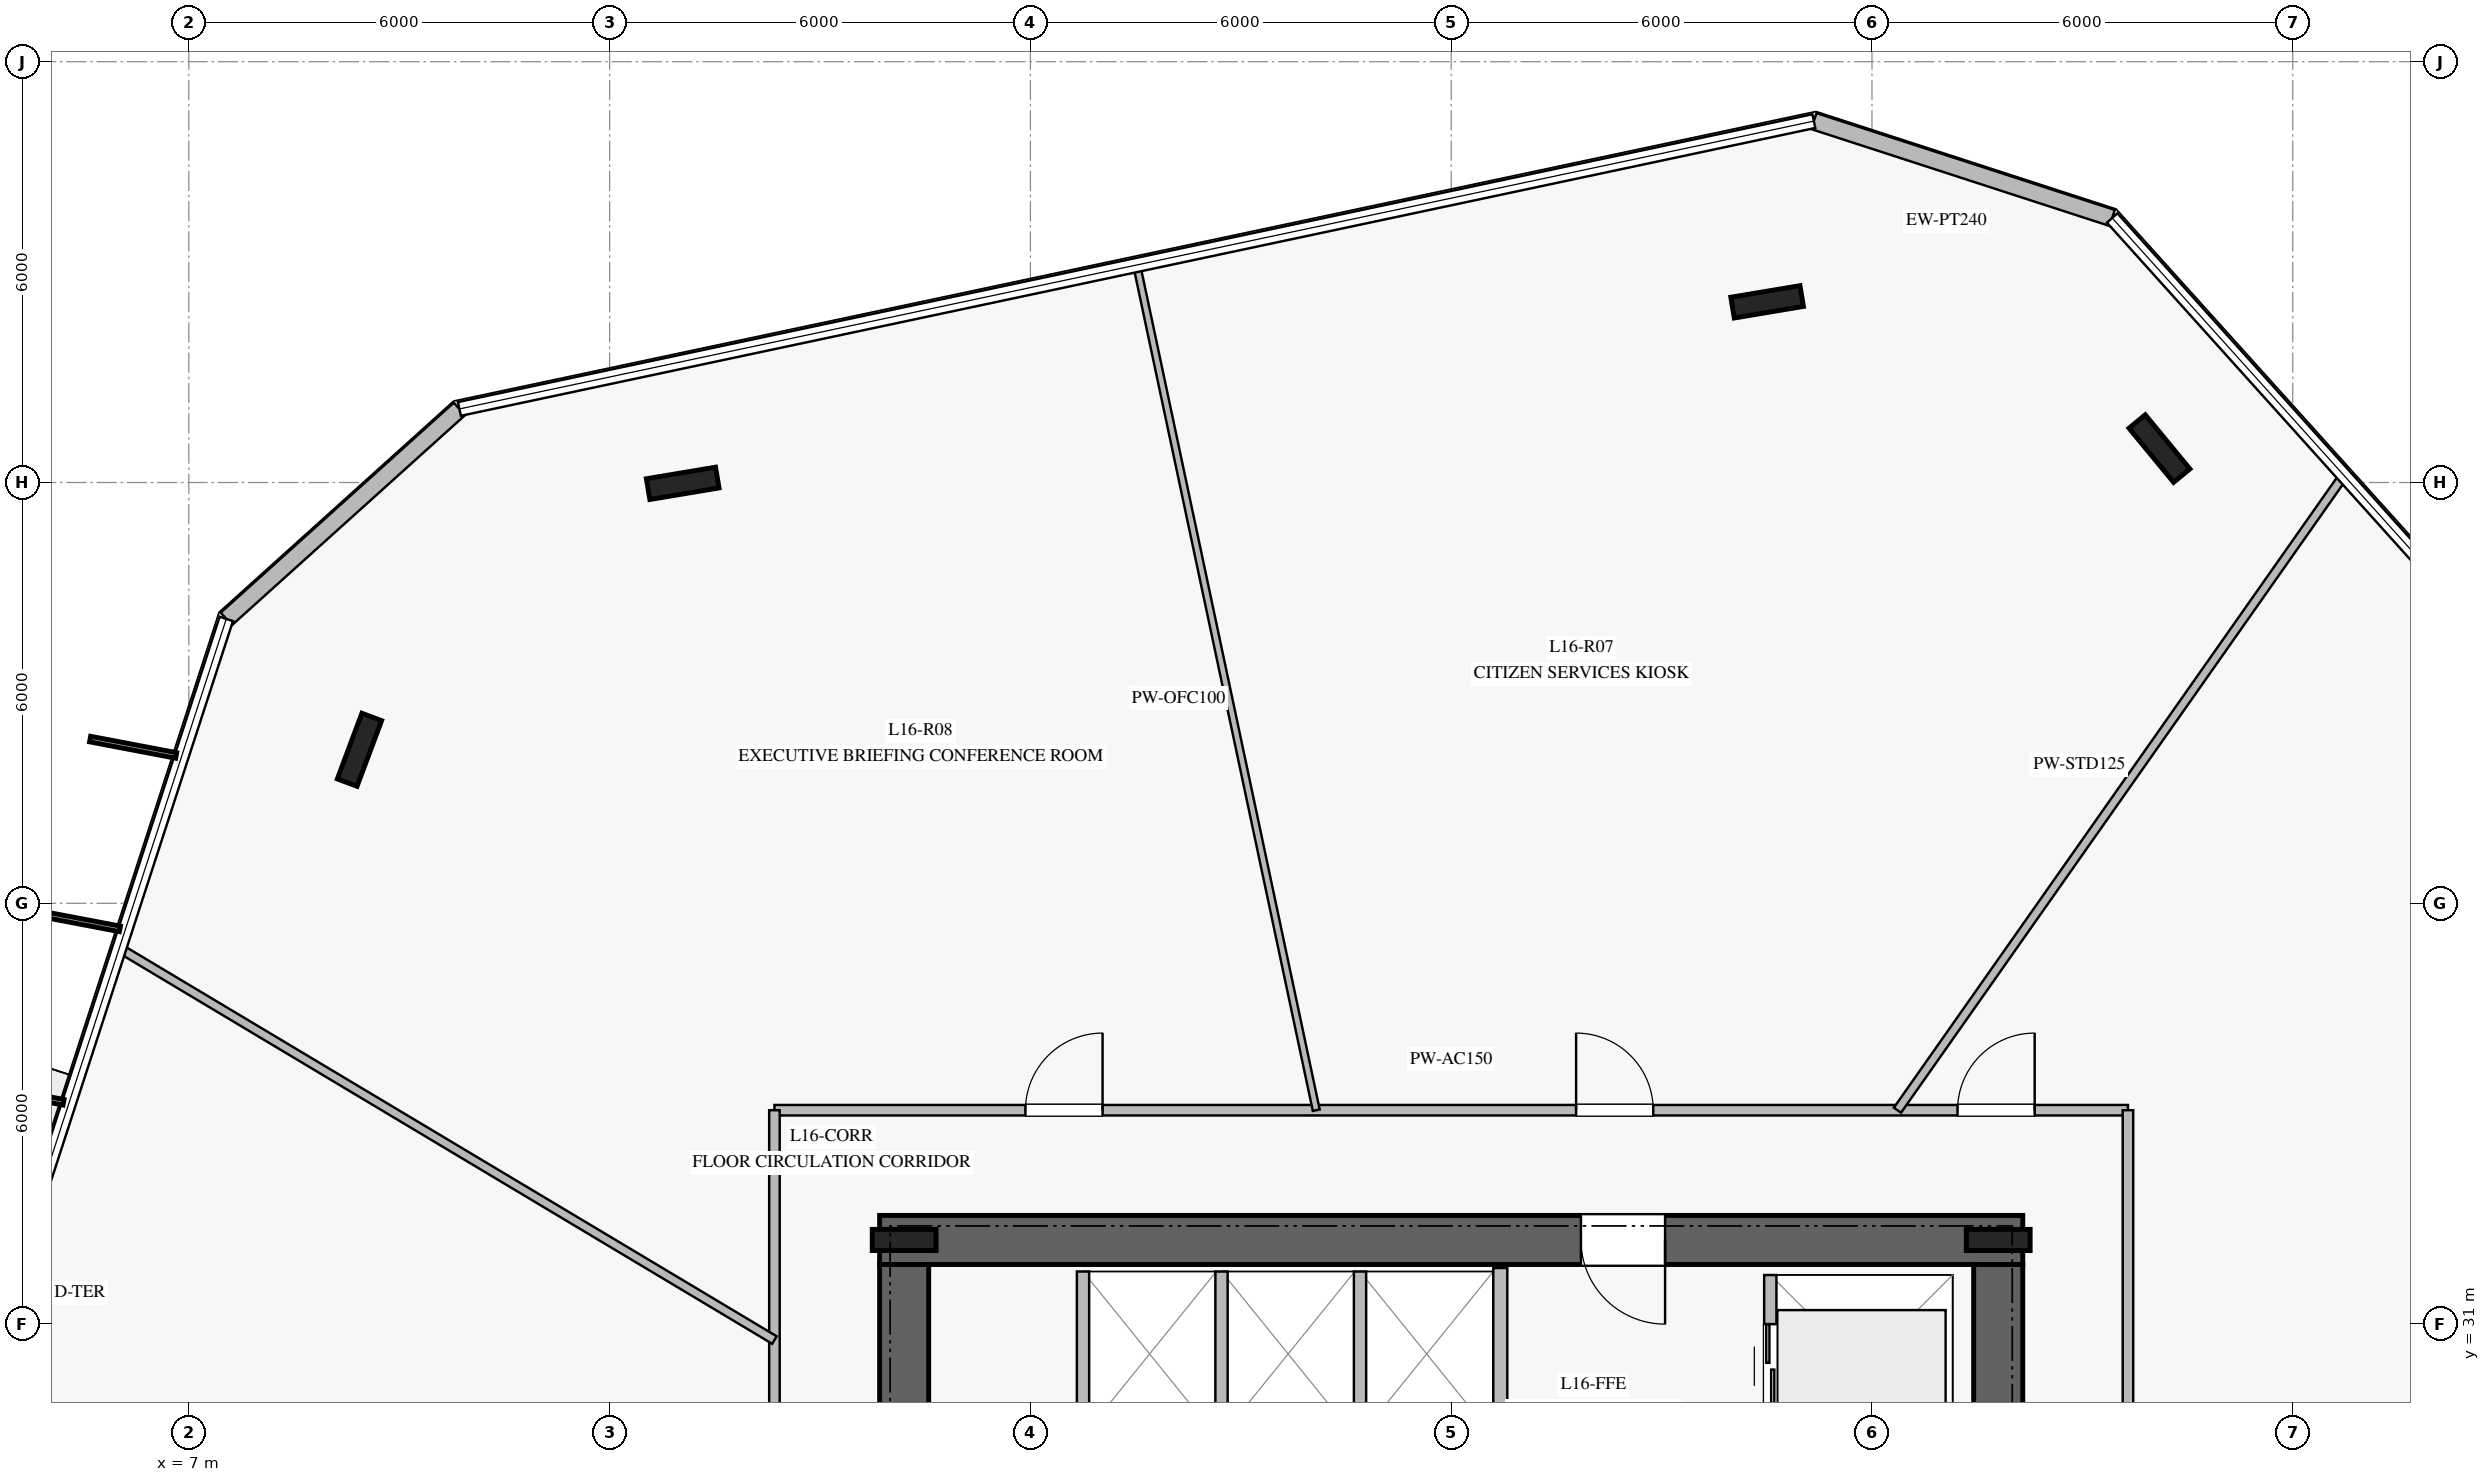
"""IFC4 building model, lengths in metres.
Left out: names, types, materials, properties, quantities, classifications, styles, units other than length and angle.
Written with IfcOpenShell. Run it as: python <this file> out.ifc"""

import sys

from ifc_helpers import new_model, si_unit, direction, frame, frame_2d, origin, origin_2d, place, context, subcontext, project, spatial, rectangle, i_section, extrude, element, fill, save


model = new_model("IFC4")
c1 = context("Model", 3, precision=1e-05, world=origin(), true_north=direction((0.0, 1.0)))
c2 = subcontext(c1, "Body", "Model", "MODEL_VIEW")
j1 = project(units=[si_unit("LENGTHUNIT", "METRE"), si_unit("PLANEANGLEUNIT", "RADIAN")], contexts=[c1])
p1 = place(None, origin())
s1 = spatial("IfcSite", under=j1, at=p1, CompositionType="ELEMENT")
p2 = place(p1, origin())
s2 = spatial("IfcBuilding", under=s1, at=p2, CompositionType="ELEMENT")
p3 = place(p2, frame((0.0, 0.0, 68.0)))
s3 = spatial("IfcBuildingStorey", under=s2, at=p3, CompositionType="ELEMENT", Elevation=68.0)
p4 = place(p3, frame((33.15, 32.2, 0.0), z_axis=(0.0, 0.0, 1.0), x_axis=(-1.0, 0.0, 0.0)))
e1 = element("IfcWall", 1, at=p4, inside=s3, PredefinedType="SHEAR", context=c2, shape_type="SweptSolid", body=[
    extrude(rectangle(XDim=16.3, YDim=0.7, at=frame_2d((8.15, 0.0))), origin(), (0.0, 0.0, 1.0), 3.76),
])
p5 = place(p4, frame((5.1, 0.0, 0.0)))
e2 = element("IfcOpeningElement", 2, at=p5, cuts=e1, PredefinedType="OPENING", context=c2, shape_type="SweptSolid", body=[
    extrude(rectangle(XDim=1.2, YDim=2.25, at=frame_2d((0.6, 1.125))), frame((0.0, 0.36, 0.0), z_axis=(0.0, -1.0, 0.0), x_axis=(1.0, 0.0, 0.0)), (0.0, 0.0, 1.0), 0.72),
])
p6 = place(p3, frame((17.2, 31.85, 0.0), z_axis=(0.0, 0.0, 1.0), x_axis=(0.0, -1.0, 0.0)))
e3 = element("IfcWall", 3, at=p6, inside=s3, PredefinedType="SHEAR", context=c2, shape_type="SweptSolid", body=[
    extrude(rectangle(XDim=13.7, YDim=0.7, at=frame_2d((6.85, 0.0))), origin(), (0.0, 0.0, 1.0), 3.76),
])
p7 = place(p6, frame((2.0, 0.0, 0.0)))
e4 = element("IfcOpeningElement", 4, at=p7, cuts=e3, PredefinedType="OPENING", context=c2, shape_type="SweptSolid", body=[
    extrude(rectangle(XDim=1.5, YDim=2.2, at=frame_2d((0.75, 1.1))), frame((0.0, 0.36, 0.0), z_axis=(0.0, -1.0, 0.0), x_axis=(1.0, 0.0, 0.0)), (0.0, 0.0, 1.0), 0.72),
])
p8 = place(p3, frame((32.8, 18.15, 0.0), z_axis=(0.0, 0.0, 1.0), x_axis=(0.0, 1.0, 0.0)))
e5 = element("IfcWall", 5, at=p8, inside=s3, PredefinedType="SHEAR", context=c2, shape_type="SweptSolid", body=[
    extrude(rectangle(XDim=13.7, YDim=0.7, at=frame_2d((6.85, 0.0))), origin(), (0.0, 0.0, 1.0), 3.76),
])
for number, where, z_axis, x_axis in (
    (6, (32.8, 32.2, 0.0), (0.0, 0.0, 1.0), (1.0, 0.0, 0.0)),
    (7, (17.2, 32.2, 0.0), (0.0, 0.0, 1.0), (1.0, 0.0, 0.0)),
):
    element("IfcColumn", number, at=place(p3, frame(where, z_axis=z_axis, x_axis=x_axis)), inside=s3, PredefinedType="COLUMN", context=c2, shape_type="SweptSolid", body=[
        extrude(i_section(OverallWidth=0.302, OverallDepth=0.91, WebThickness=0.021, FlangeThickness=0.04, at=origin_2d()), origin(), (0.0, 0.0, 1.0), 4.0),
    ])
for number, where, z_axis, x_axis in (
    (8, (35.099, 43.484, 0.0), (0.0, 0.0, 1.0), (-0.636, 0.772, 0.0)),
    (9, (29.505, 45.576, 0.0), (0.0, 0.0, 1.0), (0.986, 0.165, 0.0)),
    (10, (14.042, 42.988, 0.0), (0.0, 0.0, 1.0), (0.986, 0.165, 0.0)),
    (11, (9.433, 39.189, 0.0), (0.0, 0.0, 1.0), (0.35, 0.937, 0.0)),
):
    element("IfcColumn", number, at=place(p3, frame(where, z_axis=z_axis, x_axis=x_axis)), inside=s3, PredefinedType="COLUMN", context=c2, shape_type="SweptSolid", body=[
        extrude(i_section(OverallWidth=0.3, OverallDepth=1.0, WebThickness=0.019, FlangeThickness=0.036, at=origin_2d()), origin(), (0.0, 0.0, 1.0), 4.0),
    ])
p9 = place(p3, frame((34.425, 46.772, 0.0), z_axis=(0.0, 0.0, 1.0), x_axis=(-0.951132297172, 0.308783667438, 0.0)))
e12 = element("IfcWall", 12, at=p9, inside=s3, PredefinedType="STANDARD", context=c2, shape_type="SweptSolid", body=[
    extrude(rectangle(XDim=4.473, YDim=0.24, at=frame_2d((2.236, 0.0))), origin(), (0.0, 0.0, 1.0), 3.76),
])
p10 = place(p3, frame((10.858, 44.049, 0.0), z_axis=(0.0, 0.0, 1.0), x_axis=(-0.743009154356, -0.669281253692, 0.0)))
e13 = element("IfcWall", 13, at=p10, inside=s3, PredefinedType="STANDARD", context=c2, shape_type="SweptSolid", body=[
    extrude(rectangle(XDim=4.474, YDim=0.24, at=frame_2d((2.237, 0.0))), origin(), (0.0, 0.0, 1.0), 3.76),
])
p11 = place(p3, frame((25.7, 26.65, 0.0), z_axis=(0.0, 0.0, 1.0), x_axis=(0.0, 1.0, 0.0)))
e14 = element("IfcWall", 14, at=p11, inside=s3, PredefinedType="PARTITIONING", context=c2, shape_type="SweptSolid", body=[
    extrude(rectangle(XDim=5.15, YDim=0.2, at=frame_2d((2.575, 0.0))), origin(), (0.0, 0.0, 1.0), 3.76),
])
for number, where, z_axis, x_axis in (
    (15, (19.75, 29.4, 0.0), (0.0, 0.0, 1.0), (0.0, 1.0, 0.0)),
    (16, (21.725, 29.4, 0.0), (0.0, 0.0, 1.0), (0.0, 1.0, 0.0)),
    (17, (23.7, 29.4, 0.0), (0.0, 0.0, 1.0), (0.0, 1.0, 0.0)),
):
    element("IfcWall", number, at=place(p3, frame(where, z_axis=z_axis, x_axis=x_axis)), inside=s3, PredefinedType="PARTITIONING", context=c2, shape_type="SweptSolid", body=[
        extrude(rectangle(XDim=2.35, YDim=0.175, at=frame_2d((1.175, 0.0))), origin(), (0.0, 0.0, 1.0), 3.76),
    ])
p12 = place(p3, frame((29.55, 29.1, 0.0), z_axis=(0.0, 0.0, 1.0), x_axis=(0.0, 1.0, 0.0)))
e18 = element("IfcWall", 18, at=p12, inside=s3, PredefinedType="PARTITIONING", context=c2, shape_type="SweptSolid", body=[
    extrude(rectangle(XDim=2.6, YDim=0.175, at=frame_2d((1.3, 0.0))), origin(), (0.0, 0.0, 1.0), 3.76),
])
p13 = place(p12, frame((0.7, 0.0, 0.0)))
e19 = element("IfcOpeningElement", 19, at=p13, cuts=e18, PredefinedType="OPENING", context=c2, shape_type="SweptSolid", body=[
    extrude(rectangle(XDim=1.2, YDim=2.2, at=frame_2d((0.6, 1.1))), frame((0.0, 0.098, 0.0), z_axis=(0.0, -1.0, 0.0), x_axis=(1.0, 0.0, 0.0)), (0.0, 0.0, 1.0), 0.195),
])
p14 = place(p3, frame((15.35, 34.05, 0.0), z_axis=(0.0, 0.0, 1.0), x_axis=(1.0, 0.0, 0.0)))
e20 = element("IfcWall", 20, at=p14, inside=s3, PredefinedType="PARTITIONING", context=c2, shape_type="SweptSolid", body=[
    extrude(rectangle(XDim=19.3, YDim=0.15, at=frame_2d((9.65, 0.0))), origin(), (0.0, 0.0, 1.0), 3.21),
])
p15 = place(p14, frame((16.87, 0.0, 0.0)))
e21 = element("IfcOpeningElement", 21, at=p15, cuts=e20, PredefinedType="OPENING", context=c2, shape_type="SweptSolid", body=[
    extrude(rectangle(XDim=1.1, YDim=2.2, at=frame_2d((0.55, 1.1))), frame((0.0, 0.085, 0.0), z_axis=(0.0, -1.0, 0.0), x_axis=(1.0, 0.0, 0.0)), (0.0, 0.0, 1.0), 0.17),
])
p16 = place(p14, frame((11.431, 0.0, 0.0)))
e22 = element("IfcOpeningElement", 22, at=p16, cuts=e20, PredefinedType="OPENING", context=c2, shape_type="SweptSolid", body=[
    extrude(rectangle(XDim=1.1, YDim=2.2, at=frame_2d((0.55, 1.1))), frame((0.0, 0.085, 0.0), z_axis=(0.0, -1.0, 0.0), x_axis=(1.0, 0.0, 0.0)), (0.0, 0.0, 1.0), 0.17),
])
p17 = place(p14, frame((3.579, 0.0, 0.0)))
e23 = element("IfcOpeningElement", 23, at=p17, cuts=e20, PredefinedType="OPENING", context=c2, shape_type="SweptSolid", body=[
    extrude(rectangle(XDim=1.1, YDim=2.2, at=frame_2d((0.55, 1.1))), frame((0.0, 0.085, 0.0), z_axis=(0.0, -1.0, 0.0), x_axis=(1.0, 0.0, 0.0)), (0.0, 0.0, 1.0), 0.17),
])
p18 = place(p3, frame((34.65, 34.05, 0.0), z_axis=(0.0, 0.0, 1.0), x_axis=(0.0, -1.0, 0.0)))
e24 = element("IfcWall", 24, at=p18, inside=s3, PredefinedType="PARTITIONING", context=c2, shape_type="SweptSolid", body=[
    extrude(rectangle(XDim=18.1, YDim=0.15, at=frame_2d((9.05, 0.0))), origin(), (0.0, 0.0, 1.0), 3.21),
])
p19 = place(p18, frame((13.276, 0.0, 0.0)))
e25 = element("IfcOpeningElement", 25, at=p19, cuts=e24, PredefinedType="OPENING", context=c2, shape_type="SweptSolid", body=[
    extrude(rectangle(XDim=1.1, YDim=2.2, at=frame_2d((0.55, 1.1))), frame((0.0, 0.085, 0.0), z_axis=(0.0, -1.0, 0.0), x_axis=(1.0, 0.0, 0.0)), (0.0, 0.0, 1.0), 0.17),
])
p20 = place(p3, frame((15.35, 15.95, 0.0), z_axis=(0.0, 0.0, 1.0), x_axis=(0.0, 1.0, 0.0)))
e26 = element("IfcWall", 26, at=p20, inside=s3, PredefinedType="PARTITIONING", context=c2, shape_type="SweptSolid", body=[
    extrude(rectangle(XDim=18.1, YDim=0.15, at=frame_2d((9.05, 0.0))), origin(), (0.0, 0.0, 1.0), 3.21),
])
p21 = place(p20, frame((9.886, 0.0, 0.0)))
e27 = element("IfcOpeningElement", 27, at=p21, cuts=e26, PredefinedType="OPENING", context=c2, shape_type="SweptSolid", body=[
    extrude(rectangle(XDim=1.1, YDim=2.2, at=frame_2d((0.55, 1.1))), frame((0.0, 0.085, 0.0), z_axis=(0.0, -1.0, 0.0), x_axis=(1.0, 0.0, 0.0)), (0.0, 0.0, 1.0), 0.17),
])
p22 = place(p3, frame((31.363, 34.05, 0.0), z_axis=(0.0, 0.0, 1.0), x_axis=(0.575191769802, 0.818018598782, 0.0)))
e28 = element("IfcWall", 28, at=p22, inside=s3, PredefinedType="PARTITIONING", context=c2, shape_type="SweptSolid", body=[
    extrude(rectangle(XDim=11.048, YDim=0.125, at=frame_2d((5.524, 0.0))), origin(), (0.0, 0.0, 1.0), 3.05),
])
p23 = place(p3, frame((23.076, 34.05, 0.0), z_axis=(0.0, 0.0, 1.0), x_axis=(-0.207833360253, 0.978164247131, 0.0)))
e29 = element("IfcWall", 29, at=p23, inside=s3, PredefinedType="MOVABLE", context=c2, shape_type="SweptSolid", body=[
    extrude(rectangle(XDim=12.302, YDim=0.1, at=frame_2d((6.151, 0.0))), origin(), (0.0, 0.0, 1.0), 3.06),
])
p24 = place(p3, frame((15.35, 30.773, 0.0), z_axis=(0.0, 0.0, 1.0), x_axis=(-0.858205730497, 0.513305877759, 0.0)))
e30 = element("IfcWall", 30, at=p24, inside=s3, PredefinedType="PARTITIONING", context=c2, shape_type="SweptSolid", body=[
    extrude(rectangle(XDim=10.867, YDim=0.125, at=frame_2d((5.434, 0.0))), origin(), (0.0, 0.0, 1.0), 3.06),
])
p25 = place(p5, origin())
e31 = element("IfcDoor", 31, at=p25, inside=s3, OperationType="SINGLE_SWING_LEFT", PredefinedType="DOOR", context=c2, shape_type="SweptSolid", body=[
    extrude(rectangle(XDim=1.2, YDim=2.25, at=frame_2d((0.6, 1.125))), frame((0.0, 0.025, 0.0), z_axis=(0.0, -1.0, 0.0), x_axis=(1.0, 0.0, 0.0)), (0.0, 0.0, 1.0), 0.05),
])
fill(e2, e31)
p26 = place(p13, origin())
e32 = element("IfcDoor", 32, at=p26, inside=s3, OperationType="DOUBLE_DOOR_SLIDING", PredefinedType="DOOR", context=c2, shape_type="SweptSolid", body=[
    extrude(rectangle(XDim=1.2, YDim=2.2, at=frame_2d((0.6, 1.1))), frame((0.0, 0.025, 0.0), z_axis=(0.0, -1.0, 0.0), x_axis=(1.0, 0.0, 0.0)), (0.0, 0.0, 1.0), 0.05),
])
fill(e19, e32)
p27 = place(p15, origin())
e33 = element("IfcDoor", 33, at=p27, inside=s3, OperationType="SINGLE_SWING_RIGHT", PredefinedType="DOOR", context=c2, shape_type="SweptSolid", body=[
    extrude(rectangle(XDim=1.1, YDim=2.2, at=frame_2d((0.55, 1.1))), frame((0.0, 0.025, 0.0), z_axis=(0.0, -1.0, 0.0), x_axis=(1.0, 0.0, 0.0)), (0.0, 0.0, 1.0), 0.05),
])
fill(e21, e33)
p28 = place(p16, origin())
e34 = element("IfcDoor", 34, at=p28, inside=s3, OperationType="SINGLE_SWING_LEFT", PredefinedType="DOOR", context=c2, shape_type="SweptSolid", body=[
    extrude(rectangle(XDim=1.1, YDim=2.2, at=frame_2d((0.55, 1.1))), frame((0.0, 0.025, 0.0), z_axis=(0.0, -1.0, 0.0), x_axis=(1.0, 0.0, 0.0)), (0.0, 0.0, 1.0), 0.05),
])
fill(e22, e34)
p29 = place(p17, origin())
e35 = element("IfcDoor", 35, at=p29, inside=s3, OperationType="SINGLE_SWING_RIGHT", PredefinedType="DOOR", context=c2, shape_type="SweptSolid", body=[
    extrude(rectangle(XDim=1.1, YDim=2.2, at=frame_2d((0.55, 1.1))), frame((0.0, 0.025, 0.0), z_axis=(0.0, -1.0, 0.0), x_axis=(1.0, 0.0, 0.0)), (0.0, 0.0, 1.0), 0.05),
])
fill(e23, e35)
save(model, sys.argv[1])
